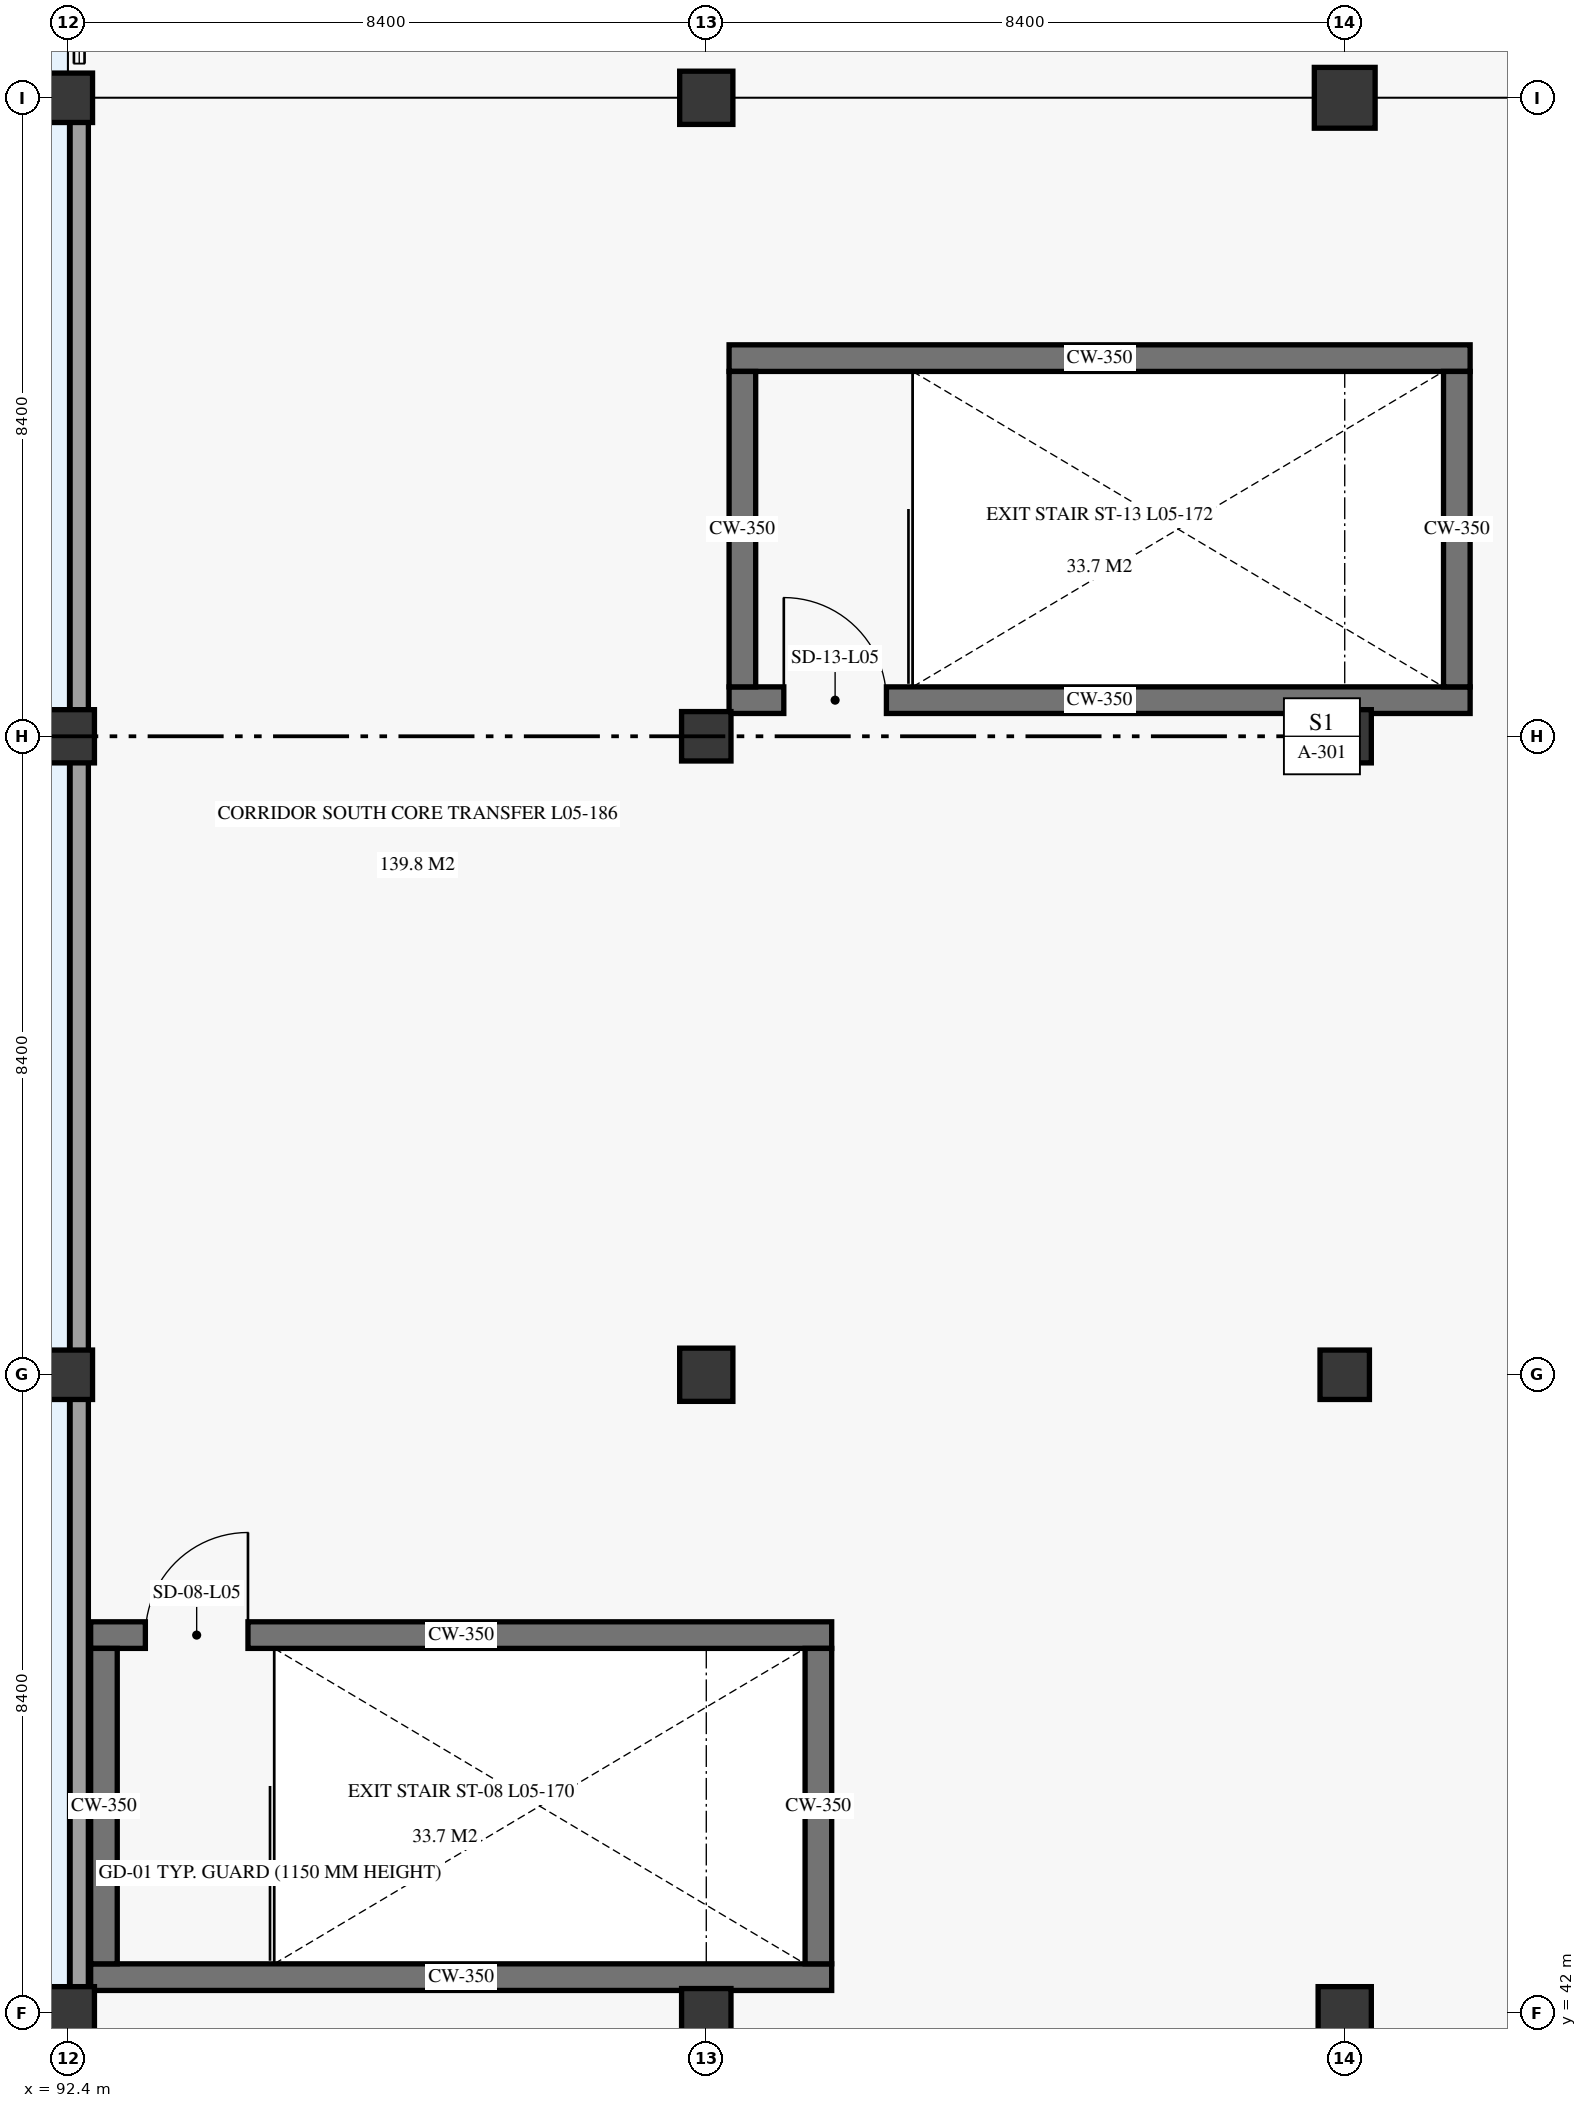
"""IFC4 building model, lengths in metres.
Left out: names, types, materials, properties, quantities, classifications, styles, units other than length and angle.
Written with IfcOpenShell. Run it as: python <this file> out.ifc"""

import sys

from ifc_helpers import new_model, si_unit, direction, frame, frame_2d, origin, origin_2d, place, context, subcontext, project, spatial, rectangle, extrude, element, fill, save


model = new_model("IFC4")
c1 = context("Model", 3, precision=1e-05, world=origin(), true_north=direction((0.0, 1.0)))
c2 = subcontext(c1, "Body", "Model", "MODEL_VIEW")
j1 = project(units=[si_unit("LENGTHUNIT", "METRE"), si_unit("PLANEANGLEUNIT", "RADIAN")], contexts=[c1])
p1 = place(None, origin())
s1 = spatial("IfcSite", under=j1, at=p1, CompositionType="ELEMENT")
p2 = place(p1, origin())
s2 = spatial("IfcBuilding", under=s1, at=p2, CompositionType="ELEMENT")
p3 = place(p2, frame((0.0, 0.0, 22.2)))
s3 = spatial("IfcBuildingStorey", under=s2, at=p3, CompositionType="ELEMENT", Elevation=22.2)
p4 = place(p3, frame((92.4, 42.0, 0.0), z_axis=(0.0, 0.0, 1.0), x_axis=(1.0, 0.0, 0.0)))
e1 = element("IfcColumn", 1, at=p4, inside=s3, PredefinedType="COLUMN", context=c2, shape_type="SweptSolid", body=[
    extrude(rectangle(XDim=0.7, YDim=0.7, at=origin_2d()), origin(), (0.0, 0.0, 1.0), 4.22),
])
p5 = place(p3, frame((92.4, 50.4, 0.0), z_axis=(0.0, 0.0, 1.0), x_axis=(1.0, 0.0, 0.0)))
e2 = element("IfcColumn", 2, at=p5, inside=s3, PredefinedType="COLUMN", context=c2, shape_type="SweptSolid", body=[
    extrude(rectangle(XDim=0.65, YDim=0.65, at=origin_2d()), origin(), (0.0, 0.0, 1.0), 4.22),
])
p6 = place(p3, frame((92.4, 58.8, 0.0), z_axis=(0.0, 0.0, 1.0), x_axis=(1.0, 0.0, 0.0)))
e3 = element("IfcColumn", 3, at=p6, inside=s3, PredefinedType="COLUMN", context=c2, shape_type="SweptSolid", body=[
    extrude(rectangle(XDim=0.7, YDim=0.7, at=origin_2d()), origin(), (0.0, 0.0, 1.0), 4.22),
])
for number, where, z_axis, x_axis in (
    (4, (92.4, 67.2, 0.0), (0.0, 0.0, 1.0), (1.0, 0.0, 0.0)),
    (5, (100.8, 42.0, 0.0), (0.0, 0.0, 1.0), (1.0, 0.0, 0.0)),
):
    element("IfcColumn", number, at=place(p3, frame(where, z_axis=z_axis, x_axis=x_axis)), inside=s3, PredefinedType="COLUMN", context=c2, shape_type="SweptSolid", body=[
        extrude(rectangle(XDim=0.65, YDim=0.65, at=origin_2d()), origin(), (0.0, 0.0, 1.0), 4.22),
    ])
p7 = place(p3, frame((100.8, 50.4, 0.0), z_axis=(0.0, 0.0, 1.0), x_axis=(1.0, 0.0, 0.0)))
e6 = element("IfcColumn", 6, at=p7, inside=s3, PredefinedType="COLUMN", context=c2, shape_type="SweptSolid", body=[
    extrude(rectangle(XDim=0.7, YDim=0.7, at=origin_2d()), origin(), (0.0, 0.0, 1.0), 4.22),
])
p8 = place(p3, frame((100.8, 58.8, 0.0), z_axis=(0.0, 0.0, 1.0), x_axis=(1.0, 0.0, 0.0)))
e7 = element("IfcColumn", 7, at=p8, inside=s3, PredefinedType="COLUMN", context=c2, shape_type="SweptSolid", body=[
    extrude(rectangle(XDim=0.65, YDim=0.65, at=origin_2d()), origin(), (0.0, 0.0, 1.0), 4.22),
])
for number, where, z_axis, x_axis in (
    (8, (100.8, 67.2, 0.0), (0.0, 0.0, 1.0), (1.0, 0.0, 0.0)),
    (9, (109.2, 42.0, 0.0), (0.0, 0.0, 1.0), (1.0, 0.0, 0.0)),
):
    element("IfcColumn", number, at=place(p3, frame(where, z_axis=z_axis, x_axis=x_axis)), inside=s3, PredefinedType="COLUMN", context=c2, shape_type="SweptSolid", body=[
        extrude(rectangle(XDim=0.7, YDim=0.7, at=origin_2d()), origin(), (0.0, 0.0, 1.0), 4.22),
    ])
p9 = place(p3, frame((109.2, 50.4, 0.0), z_axis=(0.0, 0.0, 1.0), x_axis=(1.0, 0.0, 0.0)))
e10 = element("IfcColumn", 10, at=p9, inside=s3, PredefinedType="COLUMN", context=c2, shape_type="SweptSolid", body=[
    extrude(rectangle(XDim=0.65, YDim=0.65, at=origin_2d()), origin(), (0.0, 0.0, 1.0), 4.22),
])
p10 = place(p3, frame((109.2, 58.8, 0.0), z_axis=(0.0, 0.0, 1.0), x_axis=(1.0, 0.0, 0.0)))
e11 = element("IfcColumn", 11, at=p10, inside=s3, PredefinedType="COLUMN", context=c2, shape_type="SweptSolid", body=[
    extrude(rectangle(XDim=0.7, YDim=0.7, at=origin_2d()), origin(), (0.0, 0.0, 1.0), 4.22),
])
p11 = place(p3, frame((109.2, 67.2, 0.0), z_axis=(0.0, 0.0, 1.0), x_axis=(1.0, 0.0, 0.0)))
e12 = element("IfcColumn", 12, at=p11, inside=s3, PredefinedType="COLUMN", context=c2, shape_type="SweptSolid", body=[
    extrude(rectangle(XDim=0.8, YDim=0.8, at=origin_2d()), origin(), (0.0, 0.0, 1.0), 4.22),
])
p12 = place(p3, frame((92.55, 0.15, 0.0), z_axis=(0.0, 0.0, 1.0), x_axis=(0.0, 1.0, 0.0)))
e13 = element("IfcWall", 13, at=p12, inside=s3, PredefinedType="PARAPET", context=c2, shape_type="SweptSolid", body=[
    extrude(rectangle(XDim=66.9, YDim=0.24, at=frame_2d((33.45, 0.0))), origin(), (0.0, 0.0, 1.0), 1.25),
])
p13 = place(p3, frame((92.7, 42.475, 0.0), z_axis=(0.0, 0.0, 1.0), x_axis=(1.0, 0.0, 0.0)))
e14 = element("IfcWall", 14, at=p13, inside=s3, PredefinedType="SHEAR", context=c2, shape_type="SweptSolid", body=[
    extrude(rectangle(XDim=9.75, YDim=0.35, at=frame_2d((4.875, 0.0))), origin(), (0.0, 0.0, 1.0), 4.22),
])
p14 = place(p3, frame((92.7, 46.975, 0.0), z_axis=(0.0, 0.0, 1.0), x_axis=(1.0, 0.0, 0.0)))
e15 = element("IfcWall", 15, at=p14, inside=s3, PredefinedType="SHEAR", context=c2, shape_type="SweptSolid", body=[
    extrude(rectangle(XDim=9.75, YDim=0.35, at=frame_2d((4.875, 0.0))), origin(), (0.0, 0.0, 1.0), 4.22),
])
p15 = place(p14, frame((0.72, 0.0, 0.0)))
e16 = element("IfcOpeningElement", 16, at=p15, cuts=e15, PredefinedType="OPENING", context=c2, shape_type="SweptSolid", body=[
    extrude(rectangle(XDim=1.35, YDim=2.25, at=frame_2d((0.675, 1.125))), frame((0.0, 0.185, 0.0), z_axis=(0.0, -1.0, 0.0), x_axis=(1.0, 0.0, 0.0)), (0.0, 0.0, 1.0), 0.37),
])
for number, where, z_axis, x_axis in (
    (17, (92.875, 42.65, 0.0), (0.0, 0.0, 1.0), (0.0, 1.0, 0.0)),
    (18, (102.275, 42.65, 0.0), (0.0, 0.0, 1.0), (0.0, 1.0, 0.0)),
):
    element("IfcWall", number, at=place(p3, frame(where, z_axis=z_axis, x_axis=x_axis)), inside=s3, PredefinedType="SHEAR", context=c2, shape_type="SweptSolid", body=[
        extrude(rectangle(XDim=4.15, YDim=0.35, at=frame_2d((2.075, 0.0))), origin(), (0.0, 0.0, 1.0), 4.22),
    ])
p16 = place(p3, frame((101.1, 59.275, 0.0), z_axis=(0.0, 0.0, 1.0), x_axis=(1.0, 0.0, 0.0)))
e19 = element("IfcWall", 19, at=p16, inside=s3, PredefinedType="SHEAR", context=c2, shape_type="SweptSolid", body=[
    extrude(rectangle(XDim=9.75, YDim=0.35, at=frame_2d((4.875, 0.0))), origin(), (0.0, 0.0, 1.0), 4.22),
])
p17 = place(p16, frame((0.72, 0.0, 0.0)))
e20 = element("IfcOpeningElement", 20, at=p17, cuts=e19, PredefinedType="OPENING", context=c2, shape_type="SweptSolid", body=[
    extrude(rectangle(XDim=1.35, YDim=2.25, at=frame_2d((0.675, 1.125))), frame((0.0, 0.185, 0.0), z_axis=(0.0, -1.0, 0.0), x_axis=(1.0, 0.0, 0.0)), (0.0, 0.0, 1.0), 0.37),
])
p18 = place(p3, frame((101.1, 63.775, 0.0), z_axis=(0.0, 0.0, 1.0), x_axis=(1.0, 0.0, 0.0)))
e21 = element("IfcWall", 21, at=p18, inside=s3, PredefinedType="SHEAR", context=c2, shape_type="SweptSolid", body=[
    extrude(rectangle(XDim=9.75, YDim=0.35, at=frame_2d((4.875, 0.0))), origin(), (0.0, 0.0, 1.0), 4.22),
])
for number, where, z_axis, x_axis in (
    (22, (101.275, 59.45, 0.0), (0.0, 0.0, 1.0), (0.0, 1.0, 0.0)),
    (23, (110.675, 59.45, 0.0), (0.0, 0.0, 1.0), (0.0, 1.0, 0.0)),
):
    element("IfcWall", number, at=place(p3, frame(where, z_axis=z_axis, x_axis=x_axis)), inside=s3, PredefinedType="SHEAR", context=c2, shape_type="SweptSolid", body=[
        extrude(rectangle(XDim=4.15, YDim=0.35, at=frame_2d((2.075, 0.0))), origin(), (0.0, 0.0, 1.0), 4.22),
    ])
p19 = place(p15, origin())
e24 = element("IfcDoor", 24, at=p19, inside=s3, OperationType="SINGLE_SWING_RIGHT", PredefinedType="DOOR", context=c2, shape_type="SweptSolid", body=[
    extrude(rectangle(XDim=1.35, YDim=2.25, at=frame_2d((0.675, 1.125))), frame((0.0, 0.025, 0.0), z_axis=(0.0, -1.0, 0.0), x_axis=(1.0, 0.0, 0.0)), (0.0, 0.0, 1.0), 0.05),
])
fill(e16, e24)
p20 = place(p17, origin())
e25 = element("IfcDoor", 25, at=p20, inside=s3, OperationType="SINGLE_SWING_LEFT", PredefinedType="DOOR", context=c2, shape_type="SweptSolid", body=[
    extrude(rectangle(XDim=1.35, YDim=2.25, at=frame_2d((0.675, 1.125))), frame((0.0, 0.025, 0.0), z_axis=(0.0, -1.0, 0.0), x_axis=(1.0, 0.0, 0.0)), (0.0, 0.0, 1.0), 0.05),
])
fill(e20, e25)
save(model, sys.argv[1])
